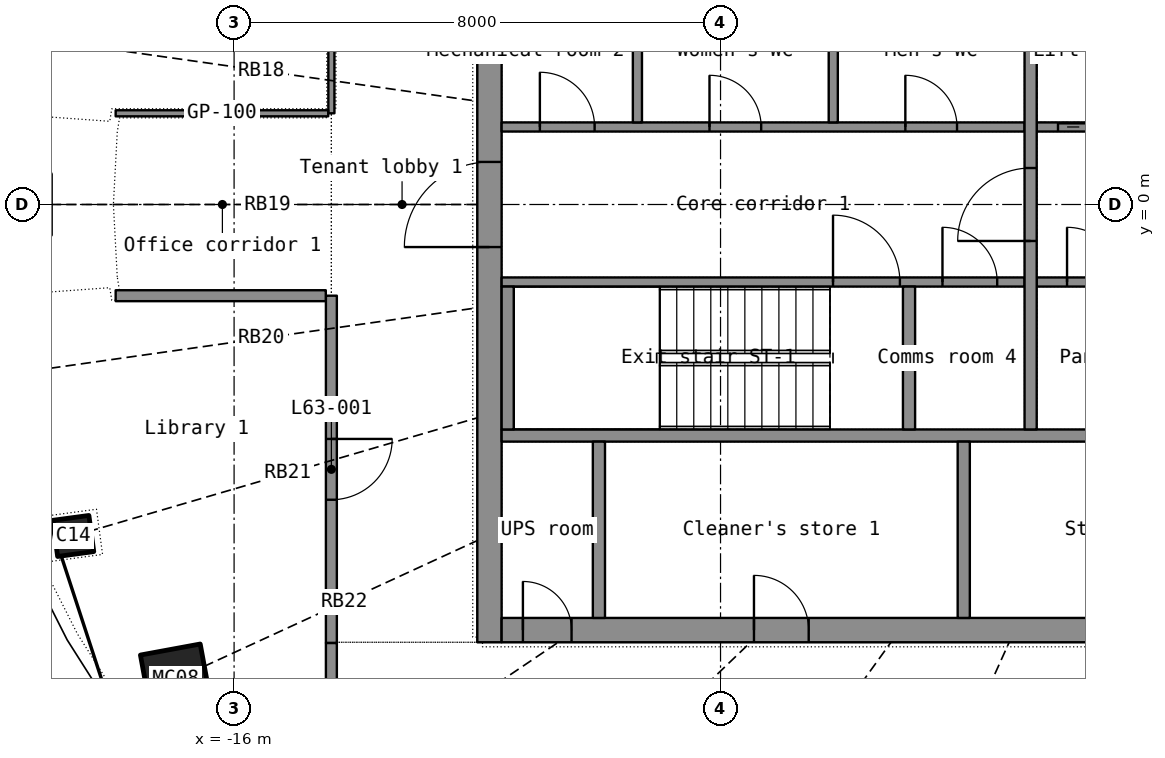
"""IFC4 building model, lengths in metres.
Left out: names, types, materials, properties, quantities, classifications, styles, units other than length and angle.
Written with IfcOpenShell. Run it as: python <this file> out.ifc"""

import sys

from ifc_helpers import new_model, si_unit, direction, frame, frame_2d, origin, origin_2d, place, context, subcontext, project, spatial, rectangle, hollow_rectangle, extrude, element, fill, save


model = new_model("IFC4")
c1 = context("Model", 3, precision=1e-05, world=origin(), true_north=direction((0.0, 1.0)))
c2 = subcontext(c1, "Body", "Model", "MODEL_VIEW")
j1 = project(units=[si_unit("LENGTHUNIT", "METRE"), si_unit("PLANEANGLEUNIT", "RADIAN")], contexts=[c1])
p1 = place(None, origin())
s1 = spatial("IfcSite", under=j1, at=p1, CompositionType="ELEMENT")
p2 = place(p1, origin())
s2 = spatial("IfcBuilding", under=s1, at=p2, CompositionType="ELEMENT")
p3 = place(p2, frame((0.0, 0.0, 257.8)))
s3 = spatial("IfcBuildingStorey", under=s2, at=p3, CompositionType="ELEMENT", Elevation=257.8)
p4 = place(p3, frame((-19.52, 0.0, 0.0), z_axis=(0.034555398, 0.0, 0.999402784), x_axis=(0.0, 1.0, 0.0)))
e1 = element("IfcColumn", 1, at=p4, inside=s3, PredefinedType="COLUMN", context=c2, shape_type="SweptSolid", body=[
    extrude(hollow_rectangle(XDim=1.0, YDim=1.0, WallThickness=0.032, at=origin_2d()), origin(), (0.0, 0.0, 1.0), 3.702),
])
p5 = place(p3, frame((-18.645, -5.452, 0.0), z_axis=(0.032511791, 0.009694185, 0.999424337), x_axis=(-0.41084003, 0.911696235, 0.004521596)))
e2 = element("IfcColumn", 2, at=p5, inside=s3, PredefinedType="COLUMN", context=c2, shape_type="SweptSolid", body=[
    extrude(hollow_rectangle(XDim=0.6, YDim=0.6, WallThickness=0.025, at=origin_2d()), origin(), (0.0, 0.0, 1.0), 3.702),
])
p6 = place(p3, frame((-16.958, -7.811, 0.0), z_axis=(0.029940667, 0.01417895, 0.999451106), x_axis=(-0.584680163, 0.811241659, 0.006006456)))
e3 = element("IfcColumn", 3, at=p6, inside=s3, PredefinedType="COLUMN", context=c2, shape_type="SweptSolid", body=[
    extrude(hollow_rectangle(XDim=1.0, YDim=1.0, WallThickness=0.032, at=origin_2d()), origin(), (0.0, 0.0, 1.0), 3.702),
])
p7 = place(p3, frame((-11.8, -7.2, 0.0), z_axis=(0.0, 0.0, 1.0), x_axis=(0.0, 1.0, 0.0)))
e4 = element("IfcWall", 4, at=p7, inside=s3, PredefinedType="SHEAR", context=c2, shape_type="SweptSolid", body=[
    extrude(rectangle(XDim=14.4, YDim=0.4, at=frame_2d((7.2, 0.0))), origin(), (0.0, 0.0, 1.0), 3.3),
])
p8 = place(p7, frame((6.5, 0.0, 0.0)))
e5 = element("IfcOpeningElement", 5, at=p8, cuts=e4, PredefinedType="OPENING", context=c2, shape_type="SweptSolid", body=[
    extrude(rectangle(XDim=1.4, YDim=2.2, at=frame_2d((0.7, 1.1))), frame((0.0, 0.21, 0.0), z_axis=(0.0, -1.0, 0.0), x_axis=(1.0, 0.0, 0.0)), (0.0, 0.0, 1.0), 0.42),
])
p9 = place(p3, frame((-11.6, -7.0, 0.0), z_axis=(0.0, 0.0, 1.0), x_axis=(1.0, 0.0, 0.0)))
e6 = element("IfcWall", 6, at=p9, inside=s3, PredefinedType="SHEAR", context=c2, shape_type="SweptSolid", body=[
    extrude(rectangle(XDim=23.2, YDim=0.4, at=frame_2d((11.6, 0.0))), origin(), (0.0, 0.0, 1.0), 3.3),
])
p10 = place(p9, frame((20.05, 0.0, 0.0)))
e7 = element("IfcOpeningElement", 7, at=p10, cuts=e6, PredefinedType="OPENING", context=c2, shape_type="SweptSolid", body=[
    extrude(rectangle(XDim=1.1, YDim=2.2, at=frame_2d((0.55, 1.1))), frame((0.0, 0.21, 0.0), z_axis=(0.0, -1.0, 0.0), x_axis=(1.0, 0.0, 0.0)), (0.0, 0.0, 1.0), 0.42),
])
p11 = place(p9, frame((4.15, 0.0, 0.0)))
e8 = element("IfcOpeningElement", 8, at=p11, cuts=e6, PredefinedType="OPENING", context=c2, shape_type="SweptSolid", body=[
    extrude(rectangle(XDim=0.9, YDim=2.1, at=frame_2d((0.45, 1.05))), frame((0.0, 0.21, 0.0), z_axis=(0.0, -1.0, 0.0), x_axis=(1.0, 0.0, 0.0)), (0.0, 0.0, 1.0), 0.42),
])
p12 = place(p9, frame((10.15, 0.0, 0.0)))
e9 = element("IfcOpeningElement", 9, at=p12, cuts=e6, PredefinedType="OPENING", context=c2, shape_type="SweptSolid", body=[
    extrude(rectangle(XDim=0.9, YDim=2.1, at=frame_2d((0.45, 1.05))), frame((0.0, 0.21, 0.0), z_axis=(0.0, -1.0, 0.0), x_axis=(1.0, 0.0, 0.0)), (0.0, 0.0, 1.0), 0.42),
])
p13 = place(p9, frame((16.15, 0.0, 0.0)))
e10 = element("IfcOpeningElement", 10, at=p13, cuts=e6, PredefinedType="OPENING", context=c2, shape_type="SweptSolid", body=[
    extrude(rectangle(XDim=0.9, YDim=2.1, at=frame_2d((0.45, 1.05))), frame((0.0, 0.21, 0.0), z_axis=(0.0, -1.0, 0.0), x_axis=(1.0, 0.0, 0.0)), (0.0, 0.0, 1.0), 0.42),
])
p14 = place(p9, frame((0.35, 0.0, 0.0)))
e11 = element("IfcOpeningElement", 11, at=p14, cuts=e6, PredefinedType="OPENING", context=c2, shape_type="SweptSolid", body=[
    extrude(rectangle(XDim=0.8, YDim=2.05, at=frame_2d((0.4, 1.025))), frame((0.0, 0.21, 0.0), z_axis=(0.0, -1.0, 0.0), x_axis=(1.0, 0.0, 0.0)), (0.0, 0.0, 1.0), 0.42),
])
p15 = place(p9, frame((22.05, 0.0, 0.0)))
e12 = element("IfcOpeningElement", 12, at=p15, cuts=e6, PredefinedType="OPENING", context=c2, shape_type="SweptSolid", body=[
    extrude(rectangle(XDim=0.8, YDim=2.05, at=frame_2d((0.4, 1.025))), frame((0.0, 0.21, 0.0), z_axis=(0.0, -1.0, 0.0), x_axis=(1.0, 0.0, 0.0)), (0.0, 0.0, 1.0), 0.42),
])
p16 = place(p3, frame((-11.6, -3.8, 0.0), z_axis=(0.0, 0.0, 1.0), x_axis=(1.0, 0.0, 0.0)))
e13 = element("IfcWall", 13, at=p16, inside=s3, PredefinedType="SHEAR", context=c2, shape_type="SweptSolid", body=[
    extrude(rectangle(XDim=23.2, YDim=0.2, at=frame_2d((11.6, 0.0))), origin(), (0.0, 0.0, 1.0), 3.3),
])
p17 = place(p3, frame((-10.0, -6.8, 0.0), z_axis=(0.0, 0.0, 1.0), x_axis=(0.0, 1.0, 0.0)))
e14 = element("IfcWall", 14, at=p17, inside=s3, PredefinedType="SHEAR", context=c2, shape_type="SweptSolid", body=[
    extrude(rectangle(XDim=2.9, YDim=0.2, at=frame_2d((1.45, 0.0))), origin(), (0.0, 0.0, 1.0), 3.3),
])
p18 = place(p3, frame((-4.0, -6.8, 0.0), z_axis=(0.0, 0.0, 1.0), x_axis=(0.0, 1.0, 0.0)))
e15 = element("IfcWall", 15, at=p18, inside=s3, PredefinedType="PARTITIONING", context=c2, shape_type="SweptSolid", body=[
    extrude(rectangle(XDim=2.9, YDim=0.2, at=frame_2d((1.45, 0.0))), origin(), (0.0, 0.0, 1.0), 3.3),
])
p19 = place(p3, frame((-11.6, -1.275, 0.0), z_axis=(0.0, 0.0, 1.0), x_axis=(1.0, 0.0, 0.0)))
e16 = element("IfcWall", 16, at=p19, inside=s3, PredefinedType="SHEAR", context=c2, shape_type="SweptSolid", body=[
    extrude(rectangle(XDim=8.6, YDim=0.15, at=frame_2d((4.3, 0.0))), origin(), (0.0, 0.0, 1.0), 3.3),
])
p20 = place(p19, frame((5.45, 0.0, 0.0)))
e17 = element("IfcOpeningElement", 17, at=p20, cuts=e16, PredefinedType="OPENING", context=c2, shape_type="SweptSolid", body=[
    extrude(rectangle(XDim=1.1, YDim=2.15, at=frame_2d((0.55, 1.075))), frame((0.0, 0.085, 0.0), z_axis=(0.0, -1.0, 0.0), x_axis=(1.0, 0.0, 0.0)), (0.0, 0.0, 1.0), 0.17),
])
p21 = place(p19, frame((7.25, 0.0, 0.0)))
e18 = element("IfcOpeningElement", 18, at=p21, cuts=e16, PredefinedType="OPENING", context=c2, shape_type="SweptSolid", body=[
    extrude(rectangle(XDim=0.9, YDim=2.1, at=frame_2d((0.45, 1.05))), frame((0.0, 0.085, 0.0), z_axis=(0.0, -1.0, 0.0), x_axis=(1.0, 0.0, 0.0)), (0.0, 0.0, 1.0), 0.17),
])
p22 = place(p3, frame((-2.8, -1.275, 0.0), z_axis=(0.0, 0.0, 1.0), x_axis=(1.0, 0.0, 0.0)))
e19 = element("IfcWall", 19, at=p22, inside=s3, PredefinedType="SHEAR", context=c2, shape_type="SweptSolid", body=[
    extrude(rectangle(XDim=5.6, YDim=0.15, at=frame_2d((2.8, 0.0))), origin(), (0.0, 0.0, 1.0), 3.3),
])
p23 = place(p22, frame((4.15, 0.0, 0.0)))
e20 = element("IfcOpeningElement", 20, at=p23, cuts=e19, PredefinedType="OPENING", context=c2, shape_type="SweptSolid", body=[
    extrude(rectangle(XDim=1.1, YDim=2.2, at=frame_2d((0.55, 1.1))), frame((0.0, 0.085, 0.0), z_axis=(0.0, -1.0, 0.0), x_axis=(1.0, 0.0, 0.0)), (0.0, 0.0, 1.0), 0.17),
])
p24 = place(p22, frame((0.499, 0.0, 0.0)))
e21 = element("IfcOpeningElement", 21, at=p24, cuts=e19, PredefinedType="OPENING", context=c2, shape_type="SweptSolid", body=[
    extrude(rectangle(XDim=0.9, YDim=2.1, at=frame_2d((0.45, 1.05))), frame((0.0, 0.085, 0.0), z_axis=(0.0, -1.0, 0.0), x_axis=(1.0, 0.0, 0.0)), (0.0, 0.0, 1.0), 0.17),
])
p25 = place(p22, frame((2.374, 0.0, 0.0)))
e22 = element("IfcOpeningElement", 22, at=p25, cuts=e19, PredefinedType="OPENING", context=c2, shape_type="SweptSolid", body=[
    extrude(rectangle(XDim=0.9, YDim=2.1, at=frame_2d((0.45, 1.05))), frame((0.0, 0.085, 0.0), z_axis=(0.0, -1.0, 0.0), x_axis=(1.0, 0.0, 0.0)), (0.0, 0.0, 1.0), 0.17),
])
p26 = place(p3, frame((-11.6, 1.275, 0.0), z_axis=(0.0, 0.0, 1.0), x_axis=(1.0, 0.0, 0.0)))
e23 = element("IfcWall", 23, at=p26, inside=s3, PredefinedType="PARTITIONING", context=c2, shape_type="SweptSolid", body=[
    extrude(rectangle(XDim=8.6, YDim=0.15, at=frame_2d((4.3, 0.0))), origin(), (0.0, 0.0, 1.0), 3.3),
])
p27 = place(p26, frame((0.629, 0.0, 0.0)))
e24 = element("IfcOpeningElement", 24, at=p27, cuts=e23, PredefinedType="OPENING", context=c2, shape_type="SweptSolid", body=[
    extrude(rectangle(XDim=0.9, YDim=2.1, at=frame_2d((0.45, 1.05))), frame((0.0, 0.085, 0.0), z_axis=(0.0, -1.0, 0.0), x_axis=(1.0, 0.0, 0.0)), (0.0, 0.0, 1.0), 0.17),
])
p28 = place(p26, frame((3.418, 0.0, 0.0)))
e25 = element("IfcOpeningElement", 25, at=p28, cuts=e23, PredefinedType="OPENING", context=c2, shape_type="SweptSolid", body=[
    extrude(rectangle(XDim=0.85, YDim=2.1, at=frame_2d((0.425, 1.05))), frame((0.0, 0.085, 0.0), z_axis=(0.0, -1.0, 0.0), x_axis=(1.0, 0.0, 0.0)), (0.0, 0.0, 1.0), 0.17),
])
p29 = place(p26, frame((6.639, 0.0, 0.0)))
e26 = element("IfcOpeningElement", 26, at=p29, cuts=e23, PredefinedType="OPENING", context=c2, shape_type="SweptSolid", body=[
    extrude(rectangle(XDim=0.85, YDim=2.1, at=frame_2d((0.425, 1.05))), frame((0.0, 0.085, 0.0), z_axis=(0.0, -1.0, 0.0), x_axis=(1.0, 0.0, 0.0)), (0.0, 0.0, 1.0), 0.17),
])
p30 = place(p3, frame((-2.8, 1.275, 0.0), z_axis=(0.0, 0.0, 1.0), x_axis=(1.0, 0.0, 0.0)))
e27 = element("IfcWall", 27, at=p30, inside=s3, PredefinedType="SHEAR", context=c2, shape_type="SweptSolid", body=[
    extrude(rectangle(XDim=5.6, YDim=0.15, at=frame_2d((2.8, 0.0))), origin(), (0.0, 0.0, 1.0), 3.3),
])
p31 = place(p30, frame((0.35, 0.0, 0.0)))
e28 = element("IfcOpeningElement", 28, at=p31, cuts=e27, PredefinedType="OPENING", context=c2, shape_type="SweptSolid", body=[
    extrude(rectangle(XDim=1.1, YDim=2.2, at=frame_2d((0.55, 1.1))), frame((0.0, 0.085, 0.0), z_axis=(0.0, -1.0, 0.0), x_axis=(1.0, 0.0, 0.0)), (0.0, 0.0, 1.0), 0.17),
])
p32 = place(p30, frame((2.413, 0.0, 0.0)))
e29 = element("IfcOpeningElement", 29, at=p32, cuts=e27, PredefinedType="OPENING", context=c2, shape_type="SweptSolid", body=[
    extrude(rectangle(XDim=0.9, YDim=2.1, at=frame_2d((0.45, 1.05))), frame((0.0, 0.085, 0.0), z_axis=(0.0, -1.0, 0.0), x_axis=(1.0, 0.0, 0.0)), (0.0, 0.0, 1.0), 0.17),
])
p33 = place(p30, frame((4.288, 0.0, 0.0)))
e30 = element("IfcOpeningElement", 30, at=p33, cuts=e27, PredefinedType="OPENING", context=c2, shape_type="SweptSolid", body=[
    extrude(rectangle(XDim=0.9, YDim=2.1, at=frame_2d((0.45, 1.05))), frame((0.0, 0.085, 0.0), z_axis=(0.0, -1.0, 0.0), x_axis=(1.0, 0.0, 0.0)), (0.0, 0.0, 1.0), 0.17),
])
p34 = place(p3, frame((-2.9, -3.7, 0.0), z_axis=(0.0, 0.0, 1.0), x_axis=(0.0, 1.0, 0.0)))
e31 = element("IfcWall", 31, at=p34, inside=s3, PredefinedType="SHEAR", context=c2, shape_type="SweptSolid", body=[
    extrude(rectangle(XDim=7.4, YDim=0.2, at=frame_2d((3.7, 0.0))), origin(), (0.0, 0.0, 1.0), 3.3),
])
p35 = place(p34, frame((3.1, 0.0, 0.0)))
e32 = element("IfcOpeningElement", 32, at=p35, cuts=e31, PredefinedType="OPENING", context=c2, shape_type="SweptSolid", body=[
    extrude(rectangle(XDim=1.2, YDim=2.2, at=frame_2d((0.6, 1.1))), frame((0.0, 0.11, 0.0), z_axis=(0.0, -1.0, 0.0), x_axis=(1.0, 0.0, 0.0)), (0.0, 0.0, 1.0), 0.22),
])
for number, where, z_axis, x_axis in (
    (33, (-11.5, -3.7, 0.0), (0.0, 0.0, 1.0), (0.0, 1.0, 0.0)),
    (34, (-4.9, -3.7, 0.0), (0.0, 0.0, 1.0), (0.0, 1.0, 0.0)),
):
    element("IfcWall", number, at=place(p3, frame(where, z_axis=z_axis, x_axis=x_axis)), inside=s3, PredefinedType="SHEAR", context=c2, shape_type="SweptSolid", body=[
        extrude(rectangle(XDim=2.35, YDim=0.2, at=frame_2d((1.175, 0.0))), origin(), (0.0, 0.0, 1.0), 3.3),
    ])
for number, where, z_axis, x_axis in (
    (35, (-9.367, 1.35, 0.0), (0.0, 0.0, 1.0), (0.0, 1.0, 0.0)),
    (36, (-6.146, 1.35, 0.0), (0.0, 0.0, 1.0), (0.0, 1.0, 0.0)),
):
    element("IfcWall", number, at=place(p3, frame(where, z_axis=z_axis, x_axis=x_axis)), inside=s3, PredefinedType="PARTITIONING", context=c2, shape_type="SweptSolid", body=[
        extrude(rectangle(XDim=2.35, YDim=0.15, at=frame_2d((1.175, 0.0))), origin(), (0.0, 0.0, 1.0), 3.3),
    ])
p36 = place(p3, frame((-14.4, -1.5, 0.0), z_axis=(0.0, 0.0, 1.0), x_axis=(0.0, -1.0, 0.0)))
e37 = element("IfcWall", 37, at=p36, inside=s3, PredefinedType="PARTITIONING", context=c2, shape_type="SweptSolid", body=[
    extrude(rectangle(XDim=5.712, YDim=0.18, at=frame_2d((2.856, 0.0))), origin(), (0.0, 0.0, 1.0), 2.4),
])
p37 = place(p36, frame((2.356, 0.0, 0.0)))
e38 = element("IfcOpeningElement", 38, at=p37, cuts=e37, PredefinedType="OPENING", context=c2, shape_type="SweptSolid", body=[
    extrude(rectangle(XDim=1.0, YDim=2.1, at=frame_2d((0.5, 1.05))), frame((0.0, 0.1, 0.0), z_axis=(0.0, -1.0, 0.0), x_axis=(1.0, 0.0, 0.0)), (0.0, 0.0, 1.0), 0.2),
])
p38 = place(p3, frame((-14.4, 7.212, 0.0), z_axis=(0.0, 0.0, 1.0), x_axis=(0.0, -1.0, 0.0)))
e39 = element("IfcWall", 39, at=p38, inside=s3, PredefinedType="PARTITIONING", context=c2, shape_type="SweptSolid", body=[
    extrude(rectangle(XDim=5.712, YDim=0.1, at=frame_2d((2.856, 0.0))), origin(), (0.0, 0.0, 1.0), 2.4),
])
p39 = place(p38, frame((2.106, 0.0, 0.0)))
e40 = element("IfcOpeningElement", 40, at=p39, cuts=e39, PredefinedType="OPENING", context=c2, shape_type="SweptSolid", body=[
    extrude(rectangle(XDim=1.5, YDim=2.4, at=frame_2d((0.75, 1.2))), frame((0.0, 0.06, 0.0), z_axis=(0.0, -1.0, 0.0), x_axis=(1.0, 0.0, 0.0)), (0.0, 0.0, 1.0), 0.12),
])
p40 = place(p3, frame((-17.948, -1.5, 0.0), z_axis=(0.0, 0.0, 1.0), x_axis=(1.0, 0.0, 0.0)))
e41 = element("IfcWall", 41, at=p40, inside=s3, PredefinedType="PARTITIONING", context=c2, shape_type="SweptSolid", body=[
    extrude(rectangle(XDim=3.456, YDim=0.18, at=frame_2d((1.728, 0.0))), origin(), (0.0, 0.0, 1.0), 2.4),
])
p41 = place(p3, frame((-14.452, 1.5, 0.0), z_axis=(0.0, 0.0, 1.0), x_axis=(-1.0, 0.0, 0.0)))
e42 = element("IfcWall", 42, at=p41, inside=s3, PredefinedType="PARTITIONING", context=c2, shape_type="SweptSolid", body=[
    extrude(rectangle(XDim=3.496, YDim=0.1, at=frame_2d((1.748, 0.0))), origin(), (0.0, 0.0, 1.0), 2.4),
])
p42 = place(p3, frame((-14.4, -7.213, 0.0), z_axis=(0.0, 0.0, 1.0), x_axis=(0.0, -1.0, 0.0)))
e43 = element("IfcWall", 43, at=p42, inside=s3, PredefinedType="PARTITIONING", context=c2, shape_type="SweptSolid", body=[
    extrude(rectangle(XDim=2.295, YDim=0.18, at=frame_2d((1.147, 0.0))), origin(), (0.0, 0.0, 1.0), 2.4),
])
p43 = place(p11, origin())
e44 = element("IfcDoor", 44, at=p43, inside=s3, OperationType="SINGLE_SWING_LEFT", PredefinedType="DOOR", context=c2, shape_type="SweptSolid", body=[
    extrude(rectangle(XDim=0.9, YDim=2.1, at=frame_2d((0.45, 1.05))), frame((0.0, 0.025, 0.0), z_axis=(0.0, -1.0, 0.0), x_axis=(1.0, 0.0, 0.0)), (0.0, 0.0, 1.0), 0.05),
])
fill(e8, e44)
p44 = place(p14, origin())
e45 = element("IfcDoor", 45, at=p44, inside=s3, OperationType="SINGLE_SWING_LEFT", PredefinedType="DOOR", context=c2, shape_type="SweptSolid", body=[
    extrude(rectangle(XDim=0.8, YDim=2.05, at=frame_2d((0.4, 1.025))), frame((0.0, 0.025, 0.0), z_axis=(0.0, -1.0, 0.0), x_axis=(1.0, 0.0, 0.0)), (0.0, 0.0, 1.0), 0.05),
])
fill(e11, e45)
p45 = place(p8, origin())
e46 = element("IfcDoor", 46, at=p45, inside=s3, OperationType="DOUBLE_DOOR_SINGLE_SWING", PredefinedType="DOOR", context=c2, shape_type="SweptSolid", body=[
    extrude(rectangle(XDim=1.4, YDim=2.2, at=frame_2d((0.7, 1.1))), frame((0.0, 0.025, 0.0), z_axis=(0.0, -1.0, 0.0), x_axis=(1.0, 0.0, 0.0)), (0.0, 0.0, 1.0), 0.05),
])
fill(e5, e46)
p46 = place(p35, origin())
e47 = element("IfcDoor", 47, at=p46, inside=s3, OperationType="SINGLE_SWING_LEFT", PredefinedType="DOOR", context=c2, shape_type="SweptSolid", body=[
    extrude(rectangle(XDim=1.2, YDim=2.2, at=frame_2d((0.6, 1.1))), frame((0.0, 0.025, 0.0), z_axis=(0.0, -1.0, 0.0), x_axis=(1.0, 0.0, 0.0)), (0.0, 0.0, 1.0), 0.05),
])
fill(e32, e47)
p47 = place(p31, origin())
e48 = element("IfcDoor", 48, at=p47, inside=s3, OperationType="DOUBLE_DOOR_SLIDING", PredefinedType="DOOR", context=c2, shape_type="SweptSolid", body=[
    extrude(rectangle(XDim=1.1, YDim=2.2, at=frame_2d((0.55, 1.1))), frame((0.0, 0.025, 0.0), z_axis=(0.0, -1.0, 0.0), x_axis=(1.0, 0.0, 0.0)), (0.0, 0.0, 1.0), 0.05),
])
fill(e28, e48)
p48 = place(p20, origin())
e49 = element("IfcDoor", 49, at=p48, inside=s3, OperationType="SINGLE_SWING_LEFT", PredefinedType="DOOR", context=c2, shape_type="SweptSolid", body=[
    extrude(rectangle(XDim=1.1, YDim=2.15, at=frame_2d((0.55, 1.075))), frame((0.0, 0.025, 0.0), z_axis=(0.0, -1.0, 0.0), x_axis=(1.0, 0.0, 0.0)), (0.0, 0.0, 1.0), 0.05),
])
fill(e17, e49)
p49 = place(p27, origin())
e50 = element("IfcDoor", 50, at=p49, inside=s3, OperationType="SINGLE_SWING_LEFT", PredefinedType="DOOR", context=c2, shape_type="SweptSolid", body=[
    extrude(rectangle(XDim=0.9, YDim=2.1, at=frame_2d((0.45, 1.05))), frame((0.0, 0.025, 0.0), z_axis=(0.0, -1.0, 0.0), x_axis=(1.0, 0.0, 0.0)), (0.0, 0.0, 1.0), 0.05),
])
fill(e24, e50)
p50 = place(p28, origin())
e51 = element("IfcDoor", 51, at=p50, inside=s3, OperationType="SINGLE_SWING_LEFT", PredefinedType="DOOR", context=c2, shape_type="SweptSolid", body=[
    extrude(rectangle(XDim=0.85, YDim=2.1, at=frame_2d((0.425, 1.05))), frame((0.0, 0.025, 0.0), z_axis=(0.0, -1.0, 0.0), x_axis=(1.0, 0.0, 0.0)), (0.0, 0.0, 1.0), 0.05),
])
fill(e25, e51)
p51 = place(p29, origin())
e52 = element("IfcDoor", 52, at=p51, inside=s3, OperationType="SINGLE_SWING_LEFT", PredefinedType="DOOR", context=c2, shape_type="SweptSolid", body=[
    extrude(rectangle(XDim=0.85, YDim=2.1, at=frame_2d((0.425, 1.05))), frame((0.0, 0.025, 0.0), z_axis=(0.0, -1.0, 0.0), x_axis=(1.0, 0.0, 0.0)), (0.0, 0.0, 1.0), 0.05),
])
fill(e26, e52)
p52 = place(p24, origin())
e53 = element("IfcDoor", 53, at=p52, inside=s3, OperationType="SINGLE_SWING_LEFT", PredefinedType="DOOR", context=c2, shape_type="SweptSolid", body=[
    extrude(rectangle(XDim=0.9, YDim=2.1, at=frame_2d((0.45, 1.05))), frame((0.0, 0.025, 0.0), z_axis=(0.0, -1.0, 0.0), x_axis=(1.0, 0.0, 0.0)), (0.0, 0.0, 1.0), 0.05),
])
fill(e21, e53)
p53 = place(p21, origin())
e54 = element("IfcDoor", 54, at=p53, inside=s3, OperationType="SINGLE_SWING_LEFT", PredefinedType="DOOR", context=c2, shape_type="SweptSolid", body=[
    extrude(rectangle(XDim=0.9, YDim=2.1, at=frame_2d((0.45, 1.05))), frame((0.0, 0.025, 0.0), z_axis=(0.0, -1.0, 0.0), x_axis=(1.0, 0.0, 0.0)), (0.0, 0.0, 1.0), 0.05),
])
fill(e18, e54)
p54 = place(p37, origin())
e55 = element("IfcDoor", 55, at=p54, inside=s3, OperationType="SINGLE_SWING_LEFT", PredefinedType="DOOR", context=c2, shape_type="SweptSolid", body=[
    extrude(rectangle(XDim=1.0, YDim=2.1, at=frame_2d((0.5, 1.05))), frame((0.0, 0.025, 0.0), z_axis=(0.0, -1.0, 0.0), x_axis=(1.0, 0.0, 0.0)), (0.0, 0.0, 1.0), 0.05),
])
fill(e38, e55)
save(model, sys.argv[1])
